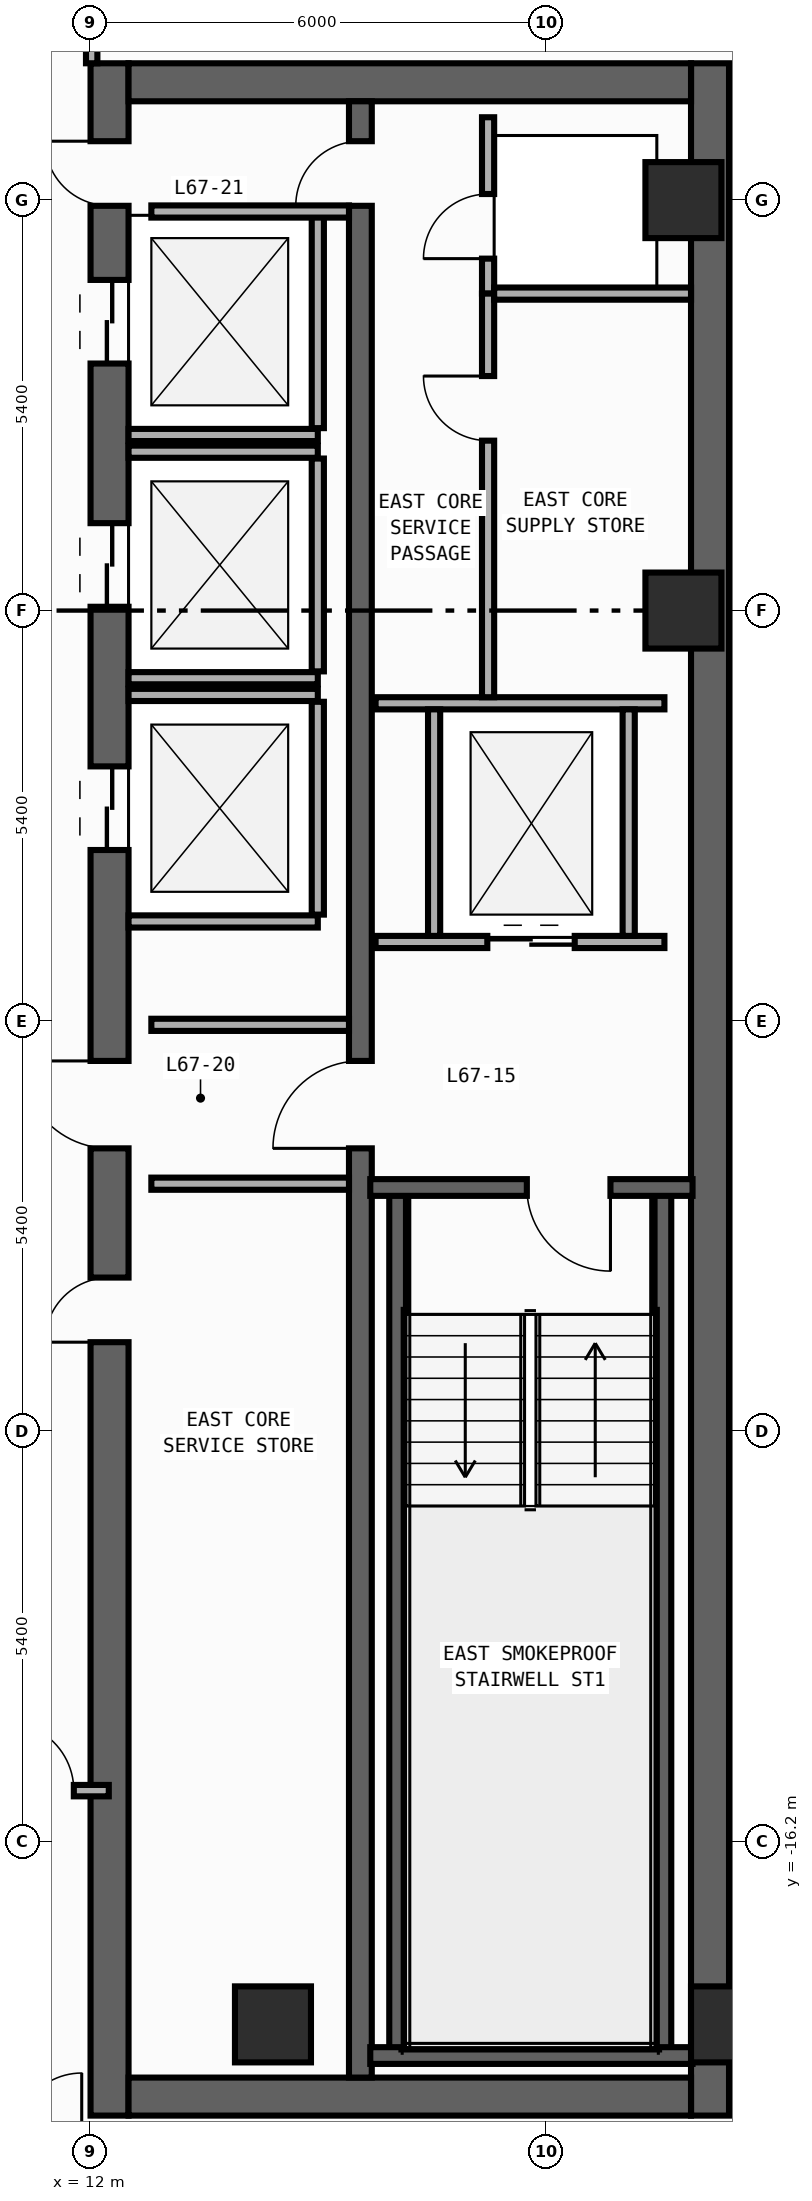
"""IFC4 building model, lengths in metres.
Left out: names, types, materials, properties, quantities, classifications, styles, units other than length and angle.
Written with IfcOpenShell. Run it as: python <this file> out.ifc"""

import sys

from ifc_helpers import new_model, si_unit, direction, frame, frame_2d, origin, origin_2d, place, context, subcontext, project, spatial, rectangle, circle, extrude, element, fill, save


model = new_model("IFC4")
c1 = context("Model", 3, precision=1e-05, world=origin(), true_north=direction((0.0, 1.0)))
c2 = subcontext(c1, "Body", "Model", "MODEL_VIEW")
j1 = project(units=[si_unit("LENGTHUNIT", "METRE"), si_unit("PLANEANGLEUNIT", "RADIAN")], contexts=[c1])
p1 = place(None, origin())
s1 = spatial("IfcSite", under=j1, at=p1, CompositionType="ELEMENT")
p2 = place(p1, origin())
s2 = spatial("IfcBuilding", under=s1, at=p2, CompositionType="ELEMENT")
p3 = place(p2, frame((0.0, 0.0, 281.4)))
s3 = spatial("IfcBuildingStorey", under=s2, at=p3, CompositionType="ELEMENT", Elevation=281.4)
p4 = place(p3, frame((12.25, -19.8, 0.0), z_axis=(0.0, 0.0, 1.0), x_axis=(0.0, 1.0, 0.0)))
e1 = element("IfcWall", 1, at=p4, inside=s3, PredefinedType="SHEAR", context=c2, shape_type="SweptSolid", body=[
    extrude(rectangle(XDim=27.0, YDim=0.5, at=frame_2d((13.5, 0.0))), origin(), (0.0, 0.0, 1.0), 3.54),
])
p5 = place(p4, frame((23.05, 0.0, 0.0)))
e2 = element("IfcOpeningElement", 2, at=p5, cuts=e1, PredefinedType="OPENING", context=c2, shape_type="SweptSolid", body=[
    extrude(rectangle(XDim=1.1, YDim=2.2, at=frame_2d((0.55, 1.1))), frame((0.0, 0.26, 0.0), z_axis=(0.0, -1.0, 0.0), x_axis=(1.0, 0.0, 0.0)), (0.0, 0.0, 1.0), 0.52),
])
p6 = place(p4, frame((19.85, 0.0, 0.0)))
e3 = element("IfcOpeningElement", 3, at=p6, cuts=e1, PredefinedType="OPENING", context=c2, shape_type="SweptSolid", body=[
    extrude(rectangle(XDim=1.1, YDim=2.2, at=frame_2d((0.55, 1.1))), frame((0.0, 0.26, 0.0), z_axis=(0.0, -1.0, 0.0), x_axis=(1.0, 0.0, 0.0)), (0.0, 0.0, 1.0), 0.52),
])
p7 = place(p4, frame((16.65, 0.0, 0.0)))
e4 = element("IfcOpeningElement", 4, at=p7, cuts=e1, PredefinedType="OPENING", context=c2, shape_type="SweptSolid", body=[
    extrude(rectangle(XDim=1.1, YDim=2.2, at=frame_2d((0.55, 1.1))), frame((0.0, 0.26, 0.0), z_axis=(0.0, -1.0, 0.0), x_axis=(1.0, 0.0, 0.0)), (0.0, 0.0, 1.0), 0.52),
])
p8 = place(p4, frame((10.175, 0.0, 0.0)))
e5 = element("IfcOpeningElement", 5, at=p8, cuts=e1, PredefinedType="OPENING", context=c2, shape_type="SweptSolid", body=[
    extrude(rectangle(XDim=0.85, YDim=2.1, at=frame_2d((0.425, 1.05))), frame((0.0, 0.26, 0.0), z_axis=(0.0, -1.0, 0.0), x_axis=(1.0, 0.0, 0.0)), (0.0, 0.0, 1.0), 0.52),
])
p9 = place(p4, frame((12.725, 0.0, 0.0)))
e6 = element("IfcOpeningElement", 6, at=p9, cuts=e1, PredefinedType="OPENING", context=c2, shape_type="SweptSolid", body=[
    extrude(rectangle(XDim=1.15, YDim=2.2, at=frame_2d((0.575, 1.1))), frame((0.0, 0.26, 0.0), z_axis=(0.0, -1.0, 0.0), x_axis=(1.0, 0.0, 0.0)), (0.0, 0.0, 1.0), 0.52),
])
p10 = place(p4, frame((25.125, 0.0, 0.0)))
e7 = element("IfcOpeningElement", 7, at=p10, cuts=e1, PredefinedType="OPENING", context=c2, shape_type="SweptSolid", body=[
    extrude(rectangle(XDim=0.85, YDim=2.1, at=frame_2d((0.425, 1.05))), frame((0.0, 0.26, 0.0), z_axis=(0.0, -1.0, 0.0), x_axis=(1.0, 0.0, 0.0)), (0.0, 0.0, 1.0), 0.52),
])
p11 = place(p3, frame((20.15, -19.8, 0.0), z_axis=(0.0, 0.0, 1.0), x_axis=(0.0, 1.0, 0.0)))
e8 = element("IfcWall", 8, at=p11, inside=s3, PredefinedType="SHEAR", context=c2, shape_type="SweptSolid", body=[
    extrude(rectangle(XDim=27.0, YDim=0.5, at=frame_2d((13.5, 0.0))), origin(), (0.0, 0.0, 1.0), 3.54),
])
for number, where, z_axis, x_axis in (
    (9, (12.5, -19.55, 0.0), (0.0, 0.0, 1.0), (1.0, 0.0, 0.0)),
    (10, (12.5, 6.95, 0.0), (0.0, 0.0, 1.0), (1.0, 0.0, 0.0)),
):
    element("IfcWall", number, at=place(p3, frame(where, z_axis=z_axis, x_axis=x_axis)), inside=s3, PredefinedType="SHEAR", context=c2, shape_type="SweptSolid", body=[
        extrude(rectangle(XDim=7.4, YDim=0.5, at=frame_2d((3.7, 0.0))), origin(), (0.0, 0.0, 1.0), 3.54),
    ])
p12 = place(p3, frame((15.55, -19.3, 0.0), z_axis=(0.0, 0.0, 1.0), x_axis=(0.0, 1.0, 0.0)))
e11 = element("IfcWall", 11, at=p12, inside=s3, PredefinedType="SHEAR", context=c2, shape_type="SweptSolid", body=[
    extrude(rectangle(XDim=26.0, YDim=0.3, at=frame_2d((13.0, 0.0))), origin(), (0.0, 0.0, 1.0), 3.54),
])
p13 = place(p12, frame((12.225, 0.0, 0.0)))
e12 = element("IfcOpeningElement", 12, at=p13, cuts=e11, PredefinedType="OPENING", context=c2, shape_type="SweptSolid", body=[
    extrude(rectangle(XDim=1.15, YDim=2.2, at=frame_2d((0.575, 1.1))), frame((0.0, 0.16, 0.0), z_axis=(0.0, -1.0, 0.0), x_axis=(1.0, 0.0, 0.0)), (0.0, 0.0, 1.0), 0.32),
])
p14 = place(p12, frame((24.625, 0.0, 0.0)))
e13 = element("IfcOpeningElement", 13, at=p14, cuts=e11, PredefinedType="OPENING", context=c2, shape_type="SweptSolid", body=[
    extrude(rectangle(XDim=0.85, YDim=2.1, at=frame_2d((0.425, 1.05))), frame((0.0, 0.16, 0.0), z_axis=(0.0, -1.0, 0.0), x_axis=(1.0, 0.0, 0.0)), (0.0, 0.0, 1.0), 0.32),
])
for number, where, z_axis, x_axis in (
    (14, (16.04, -19.01, 0.0), (0.0, 0.0, 1.0), (0.0, 1.0, 0.0)),
    (15, (19.53, -19.01, 0.0), (0.0, 0.0, 1.0), (0.0, 1.0, 0.0)),
):
    element("IfcWall", number, at=place(p3, frame(where, z_axis=z_axis, x_axis=x_axis)), inside=s3, PredefinedType="SHEAR", context=c2, shape_type="SweptSolid", body=[
        extrude(rectangle(XDim=11.42, YDim=0.22, at=frame_2d((5.71, 0.0))), origin(), (0.0, 0.0, 1.0), 3.54),
    ])
p15 = place(p3, frame((15.68, -19.01, 0.0), z_axis=(0.0, 0.0, 1.0), x_axis=(1.0, 0.0, 0.0)))
e16 = element("IfcWall", 16, at=p15, inside=s3, PredefinedType="SHEAR", context=c2, shape_type="SweptSolid", body=[
    extrude(rectangle(XDim=4.24, YDim=0.22, at=frame_2d((2.12, 0.0))), origin(), (0.0, 0.0, 1.0), 3.54),
])
p16 = place(p3, frame((19.92, -7.59, 0.0), z_axis=(0.0, 0.0, 1.0), x_axis=(-1.0, 0.0, 0.0)))
e17 = element("IfcWall", 17, at=p16, inside=s3, PredefinedType="SHEAR", context=c2, shape_type="SweptSolid", body=[
    extrude(rectangle(XDim=4.24, YDim=0.22, at=frame_2d((2.12, 0.0))), origin(), (0.0, 0.0, 1.0), 3.54),
])
p17 = place(p16, frame((1.08, 0.0, 0.0)))
e18 = element("IfcOpeningElement", 18, at=p17, cuts=e17, PredefinedType="OPENING", context=c2, shape_type="SweptSolid", body=[
    extrude(rectangle(XDim=1.1, YDim=2.2, at=frame_2d((0.55, 1.1))), frame((0.0, 0.12, 0.0), z_axis=(0.0, -1.0, 0.0), x_axis=(1.0, 0.0, 0.0)), (0.0, 0.0, 1.0), 0.24),
])
for number, where, z_axis, x_axis in (
    (19, (20.4, -18.6, 0.0), (0.0, 0.0, 1.0), (1.0, 0.0, 0.0)),
    (20, (14.4, -18.6, 0.0), (0.0, 0.0, 1.0), (1.0, 0.0, 0.0)),
    (21, (19.8, 0.0, 0.0), (0.0, 0.0, 1.0), (1.0, 0.0, 0.0)),
    (22, (19.8, 5.4, 0.0), (0.0, 0.0, 1.0), (1.0, 0.0, 0.0)),
):
    element("IfcColumn", number, at=place(p3, frame(where, z_axis=z_axis, x_axis=x_axis)), inside=s3, PredefinedType="COLUMN", context=c2, shape_type="SweptSolid", body=[
        extrude(circle(Radius=0.5, at=origin_2d()), origin(), (0.0, 0.0, 1.0), 3.8),
    ])
p18 = place(p3, frame((12.5, 2.31, 0.0), z_axis=(0.0, 0.0, 1.0), x_axis=(1.0, 0.0, 0.0)))
e23 = element("IfcWall", 23, at=p18, inside=s3, PredefinedType="STANDARD", context=c2, shape_type="SweptSolid", body=[
    extrude(rectangle(XDim=2.49, YDim=0.16, at=frame_2d((1.245, 0.0))), origin(), (0.0, 0.0, 1.0), 3.54),
])
p19 = place(p3, frame((14.99, 2.4, 0.0), z_axis=(0.0, 0.0, 1.0), x_axis=(0.0, 1.0, 0.0)))
e24 = element("IfcWall", 24, at=p19, inside=s3, PredefinedType="STANDARD", context=c2, shape_type="SweptSolid", body=[
    extrude(rectangle(XDim=2.8, YDim=0.16, at=frame_2d((1.4, 0.0))), origin(), (0.0, 0.0, 1.0), 3.54),
])
for number, where, z_axis, x_axis in (
    (25, (12.5, -0.89, 0.0), (0.0, 0.0, 1.0), (1.0, 0.0, 0.0)),
    (26, (12.5, 2.09, 0.0), (0.0, 0.0, 1.0), (1.0, 0.0, 0.0)),
):
    element("IfcWall", number, at=place(p3, frame(where, z_axis=z_axis, x_axis=x_axis)), inside=s3, PredefinedType="STANDARD", context=c2, shape_type="SweptSolid", body=[
        extrude(rectangle(XDim=2.49, YDim=0.16, at=frame_2d((1.245, 0.0))), origin(), (0.0, 0.0, 1.0), 3.54),
    ])
p20 = place(p3, frame((14.99, -0.8, 0.0), z_axis=(0.0, 0.0, 1.0), x_axis=(0.0, 1.0, 0.0)))
e27 = element("IfcWall", 27, at=p20, inside=s3, PredefinedType="STANDARD", context=c2, shape_type="SweptSolid", body=[
    extrude(rectangle(XDim=2.8, YDim=0.16, at=frame_2d((1.4, 0.0))), origin(), (0.0, 0.0, 1.0), 3.54),
])
for number, where, z_axis, x_axis in (
    (28, (12.5, -4.09, 0.0), (0.0, 0.0, 1.0), (1.0, 0.0, 0.0)),
    (29, (12.5, -1.11, 0.0), (0.0, 0.0, 1.0), (1.0, 0.0, 0.0)),
):
    element("IfcWall", number, at=place(p3, frame(where, z_axis=z_axis, x_axis=x_axis)), inside=s3, PredefinedType="STANDARD", context=c2, shape_type="SweptSolid", body=[
        extrude(rectangle(XDim=2.49, YDim=0.16, at=frame_2d((1.245, 0.0))), origin(), (0.0, 0.0, 1.0), 3.54),
    ])
p21 = place(p3, frame((14.99, -4.0, 0.0), z_axis=(0.0, 0.0, 1.0), x_axis=(0.0, 1.0, 0.0)))
e30 = element("IfcWall", 30, at=p21, inside=s3, PredefinedType="STANDARD", context=c2, shape_type="SweptSolid", body=[
    extrude(rectangle(XDim=2.8, YDim=0.16, at=frame_2d((1.4, 0.0))), origin(), (0.0, 0.0, 1.0), 3.54),
])
p22 = place(p3, frame((15.75, -4.36, 0.0), z_axis=(0.0, 0.0, 1.0), x_axis=(1.0, 0.0, 0.0)))
e31 = element("IfcWall", 31, at=p22, inside=s3, PredefinedType="STANDARD", context=c2, shape_type="SweptSolid", body=[
    extrude(rectangle(XDim=3.8, YDim=0.16, at=frame_2d((1.9, 0.0))), origin(), (0.0, 0.0, 1.0), 3.54),
])
p23 = place(p22, frame((1.47, 0.0, 0.0)))
e32 = element("IfcOpeningElement", 32, at=p23, cuts=e31, PredefinedType="OPENING", context=c2, shape_type="SweptSolid", body=[
    extrude(rectangle(XDim=1.15, YDim=2.2, at=frame_2d((0.575, 1.1))), frame((0.0, 0.09, 0.0), z_axis=(0.0, -1.0, 0.0), x_axis=(1.0, 0.0, 0.0)), (0.0, 0.0, 1.0), 0.18),
])
p24 = place(p3, frame((15.75, -1.22, 0.0), z_axis=(0.0, 0.0, 1.0), x_axis=(1.0, 0.0, 0.0)))
e33 = element("IfcWall", 33, at=p24, inside=s3, PredefinedType="STANDARD", context=c2, shape_type="SweptSolid", body=[
    extrude(rectangle(XDim=3.8, YDim=0.16, at=frame_2d((1.9, 0.0))), origin(), (0.0, 0.0, 1.0), 3.54),
])
for number, where, z_axis, x_axis in (
    (34, (16.52, -4.28, 0.0), (0.0, 0.0, 1.0), (0.0, 1.0, 0.0)),
    (35, (19.08, -4.28, 0.0), (0.0, 0.0, 1.0), (0.0, 1.0, 0.0)),
):
    element("IfcWall", number, at=place(p3, frame(where, z_axis=z_axis, x_axis=x_axis)), inside=s3, PredefinedType="STANDARD", context=c2, shape_type="SweptSolid", body=[
        extrude(rectangle(XDim=2.98, YDim=0.16, at=frame_2d((1.49, 0.0))), origin(), (0.0, 0.0, 1.0), 3.54),
    ])
for number, where, z_axis, x_axis in (
    (36, (12.8, -5.45, 0.0), (0.0, 0.0, 1.0), (1.0, 0.0, 0.0)),
    (37, (12.8, -7.54, 0.0), (0.0, 0.0, 1.0), (1.0, 0.0, 0.0)),
    (38, (12.8, 5.25, 0.0), (0.0, 0.0, 1.0), (1.0, 0.0, 0.0)),
):
    element("IfcWall", number, at=place(p3, frame(where, z_axis=z_axis, x_axis=x_axis)), inside=s3, PredefinedType="STANDARD", context=c2, shape_type="SweptSolid", body=[
        extrude(rectangle(XDim=2.6, YDim=0.16, at=frame_2d((1.3, 0.0))), origin(), (0.0, 0.0, 1.0), 3.54),
    ])
p25 = place(p3, frame((17.23, 4.17, 0.0), z_axis=(0.0, 0.0, 1.0), x_axis=(0.0, 1.0, 0.0)))
e39 = element("IfcWall", 39, at=p25, inside=s3, PredefinedType="PARTITIONING", context=c2, shape_type="SweptSolid", body=[
    extrude(rectangle(XDim=2.32, YDim=0.16, at=frame_2d((1.16, 0.0))), origin(), (0.0, 0.0, 1.0), 3.54),
])
p26 = place(p25, frame((0.46, 0.0, 0.0)))
e40 = element("IfcOpeningElement", 40, at=p26, cuts=e39, PredefinedType="OPENING", context=c2, shape_type="SweptSolid", body=[
    extrude(rectangle(XDim=0.85, YDim=2.1, at=frame_2d((0.425, 1.05))), frame((0.0, 0.09, 0.0), z_axis=(0.0, -1.0, 0.0), x_axis=(1.0, 0.0, 0.0)), (0.0, 0.0, 1.0), 0.18),
])
p27 = place(p3, frame((17.23, -1.14, 0.0), z_axis=(0.0, 0.0, 1.0), x_axis=(0.0, 1.0, 0.0)))
e41 = element("IfcWall", 41, at=p27, inside=s3, PredefinedType="PARTITIONING", context=c2, shape_type="SweptSolid", body=[
    extrude(rectangle(XDim=5.31, YDim=0.16, at=frame_2d((2.655, 0.0))), origin(), (0.0, 0.0, 1.0), 3.54),
])
p28 = place(p27, frame((3.375, 0.0, 0.0)))
e42 = element("IfcOpeningElement", 42, at=p28, cuts=e41, PredefinedType="OPENING", context=c2, shape_type="SweptSolid", body=[
    extrude(rectangle(XDim=0.85, YDim=2.1, at=frame_2d((0.425, 1.05))), frame((0.0, 0.09, 0.0), z_axis=(0.0, -1.0, 0.0), x_axis=(1.0, 0.0, 0.0)), (0.0, 0.0, 1.0), 0.18),
])
p29 = place(p3, frame((17.31, 4.17, 0.0), z_axis=(0.0, 0.0, 1.0), x_axis=(1.0, 0.0, 0.0)))
e43 = element("IfcWall", 43, at=p29, inside=s3, PredefinedType="PARTITIONING", context=c2, shape_type="SweptSolid", body=[
    extrude(rectangle(XDim=2.59, YDim=0.16, at=frame_2d((1.295, 0.0))), origin(), (0.0, 0.0, 1.0), 3.54),
])
p30 = place(p3, frame((12.015, 7.2, 0.0), z_axis=(0.0, 0.0, 1.0), x_axis=(0.0, 1.0, 0.0)))
e44 = element("IfcWall", 44, at=p30, inside=s3, PredefinedType="PARTITIONING", context=c2, shape_type="SweptSolid", body=[
    extrude(rectangle(XDim=6.68, YDim=0.15, at=frame_2d((3.34, 0.0))), origin(), (0.0, 0.0, 1.0), 3.54),
])
p31 = place(p30, frame((0.67, 0.0, 0.0)))
e45 = element("IfcOpeningElement", 45, at=p31, cuts=e44, PredefinedType="OPENING", context=c2, shape_type="SweptSolid", body=[
    extrude(rectangle(XDim=0.9, YDim=2.15, at=frame_2d((0.45, 1.075))), frame((0.0, 0.085, 0.0), z_axis=(0.0, -1.0, 0.0), x_axis=(1.0, 0.0, 0.0)), (0.0, 0.0, 1.0), 0.17),
])
p32 = place(p3, frame((1.19, -15.525, 0.0), z_axis=(0.0, 0.0, 1.0), x_axis=(1.0, 0.0, 0.0)))
e46 = element("IfcWall", 46, at=p32, inside=s3, PredefinedType="PARTITIONING", context=c2, shape_type="SweptSolid", body=[
    extrude(rectangle(XDim=11.05, YDim=0.15, at=frame_2d((5.525, 0.0))), origin(), (0.0, 0.0, 1.0), 3.54),
])
p33 = place(p32, frame((9.69, 0.0, 0.0)))
e47 = element("IfcOpeningElement", 47, at=p33, cuts=e46, PredefinedType="OPENING", context=c2, shape_type="SweptSolid", body=[
    extrude(rectangle(XDim=0.9, YDim=2.15, at=frame_2d((0.45, 1.075))), frame((0.0, 0.085, 0.0), z_axis=(0.0, -1.0, 0.0), x_axis=(1.0, 0.0, 0.0)), (0.0, 0.0, 1.0), 0.17),
])
p34 = place(p17, origin())
e48 = element("IfcDoor", 48, at=p34, inside=s3, OperationType="SINGLE_SWING_LEFT", PredefinedType="DOOR", context=c2, shape_type="SweptSolid", body=[
    extrude(rectangle(XDim=1.1, YDim=2.2, at=frame_2d((0.55, 1.1))), frame((0.0, 0.025, 0.0), z_axis=(0.0, -1.0, 0.0), x_axis=(1.0, 0.0, 0.0)), (0.0, 0.0, 1.0), 0.05),
])
fill(e18, e48)
p35 = place(p5, origin())
e49 = element("IfcDoor", 49, at=p35, inside=s3, OperationType="DOUBLE_DOOR_SLIDING", PredefinedType="DOOR", context=c2, shape_type="SweptSolid", body=[
    extrude(rectangle(XDim=1.1, YDim=2.2, at=frame_2d((0.55, 1.1))), frame((0.0, 0.025, 0.0), z_axis=(0.0, -1.0, 0.0), x_axis=(1.0, 0.0, 0.0)), (0.0, 0.0, 1.0), 0.05),
])
fill(e2, e49)
p36 = place(p6, origin())
e50 = element("IfcDoor", 50, at=p36, inside=s3, OperationType="DOUBLE_DOOR_SLIDING", PredefinedType="DOOR", context=c2, shape_type="SweptSolid", body=[
    extrude(rectangle(XDim=1.1, YDim=2.2, at=frame_2d((0.55, 1.1))), frame((0.0, 0.025, 0.0), z_axis=(0.0, -1.0, 0.0), x_axis=(1.0, 0.0, 0.0)), (0.0, 0.0, 1.0), 0.05),
])
fill(e3, e50)
p37 = place(p7, origin())
e51 = element("IfcDoor", 51, at=p37, inside=s3, OperationType="DOUBLE_DOOR_SLIDING", PredefinedType="DOOR", context=c2, shape_type="SweptSolid", body=[
    extrude(rectangle(XDim=1.1, YDim=2.2, at=frame_2d((0.55, 1.1))), frame((0.0, 0.025, 0.0), z_axis=(0.0, -1.0, 0.0), x_axis=(1.0, 0.0, 0.0)), (0.0, 0.0, 1.0), 0.05),
])
fill(e4, e51)
p38 = place(p8, origin())
e52 = element("IfcDoor", 52, at=p38, inside=s3, OperationType="SINGLE_SWING_LEFT", PredefinedType="DOOR", context=c2, shape_type="SweptSolid", body=[
    extrude(rectangle(XDim=0.85, YDim=2.1, at=frame_2d((0.425, 1.05))), frame((0.0, 0.025, 0.0), z_axis=(0.0, -1.0, 0.0), x_axis=(1.0, 0.0, 0.0)), (0.0, 0.0, 1.0), 0.05),
])
fill(e5, e52)
p39 = place(p9, origin())
e53 = element("IfcDoor", 53, at=p39, inside=s3, OperationType="SINGLE_SWING_RIGHT", PredefinedType="DOOR", context=c2, shape_type="SweptSolid", body=[
    extrude(rectangle(XDim=1.15, YDim=2.2, at=frame_2d((0.575, 1.1))), frame((0.0, 0.025, 0.0), z_axis=(0.0, -1.0, 0.0), x_axis=(1.0, 0.0, 0.0)), (0.0, 0.0, 1.0), 0.05),
])
fill(e6, e53)
p40 = place(p13, origin())
e54 = element("IfcDoor", 54, at=p40, inside=s3, OperationType="SINGLE_SWING_LEFT", PredefinedType="DOOR", context=c2, shape_type="SweptSolid", body=[
    extrude(rectangle(XDim=1.15, YDim=2.2, at=frame_2d((0.575, 1.1))), frame((0.0, 0.025, 0.0), z_axis=(0.0, -1.0, 0.0), x_axis=(1.0, 0.0, 0.0)), (0.0, 0.0, 1.0), 0.05),
])
fill(e12, e54)
p41 = place(p10, origin())
e55 = element("IfcDoor", 55, at=p41, inside=s3, OperationType="SINGLE_SWING_RIGHT", PredefinedType="DOOR", context=c2, shape_type="SweptSolid", body=[
    extrude(rectangle(XDim=0.85, YDim=2.1, at=frame_2d((0.425, 1.05))), frame((0.0, 0.025, 0.0), z_axis=(0.0, -1.0, 0.0), x_axis=(1.0, 0.0, 0.0)), (0.0, 0.0, 1.0), 0.05),
])
fill(e7, e55)
p42 = place(p14, origin())
e56 = element("IfcDoor", 56, at=p42, inside=s3, OperationType="SINGLE_SWING_LEFT", PredefinedType="DOOR", context=c2, shape_type="SweptSolid", body=[
    extrude(rectangle(XDim=0.85, YDim=2.1, at=frame_2d((0.425, 1.05))), frame((0.0, 0.025, 0.0), z_axis=(0.0, -1.0, 0.0), x_axis=(1.0, 0.0, 0.0)), (0.0, 0.0, 1.0), 0.05),
])
fill(e13, e56)
p43 = place(p23, origin())
e57 = element("IfcDoor", 57, at=p43, inside=s3, OperationType="DOUBLE_DOOR_SLIDING", PredefinedType="DOOR", context=c2, shape_type="SweptSolid", body=[
    extrude(rectangle(XDim=1.15, YDim=2.2, at=frame_2d((0.575, 1.1))), frame((0.0, 0.025, 0.0), z_axis=(0.0, -1.0, 0.0), x_axis=(1.0, 0.0, 0.0)), (0.0, 0.0, 1.0), 0.05),
])
fill(e32, e57)
p44 = place(p26, origin())
e58 = element("IfcDoor", 58, at=p44, inside=s3, OperationType="SINGLE_SWING_LEFT", PredefinedType="DOOR", context=c2, shape_type="SweptSolid", body=[
    extrude(rectangle(XDim=0.85, YDim=2.1, at=frame_2d((0.425, 1.05))), frame((0.0, 0.025, 0.0), z_axis=(0.0, -1.0, 0.0), x_axis=(1.0, 0.0, 0.0)), (0.0, 0.0, 1.0), 0.05),
])
fill(e40, e58)
p45 = place(p28, origin())
e59 = element("IfcDoor", 59, at=p45, inside=s3, OperationType="SINGLE_SWING_RIGHT", PredefinedType="DOOR", context=c2, shape_type="SweptSolid", body=[
    extrude(rectangle(XDim=0.85, YDim=2.1, at=frame_2d((0.425, 1.05))), frame((0.0, 0.025, 0.0), z_axis=(0.0, -1.0, 0.0), x_axis=(1.0, 0.0, 0.0)), (0.0, 0.0, 1.0), 0.05),
])
fill(e42, e59)
p46 = place(p33, origin())
e60 = element("IfcDoor", 60, at=p46, inside=s3, OperationType="SINGLE_SWING_LEFT", PredefinedType="DOOR", context=c2, shape_type="SweptSolid", body=[
    extrude(rectangle(XDim=0.9, YDim=2.15, at=frame_2d((0.45, 1.075))), frame((0.0, 0.025, 0.0), z_axis=(0.0, -1.0, 0.0), x_axis=(1.0, 0.0, 0.0)), (0.0, 0.0, 1.0), 0.05),
])
fill(e47, e60)
save(model, sys.argv[1])
